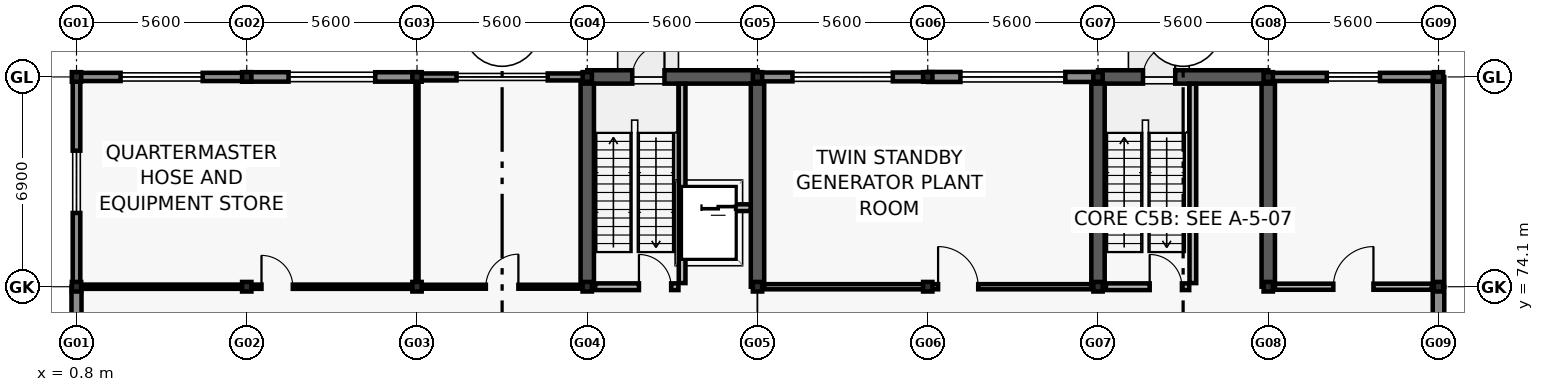
"""IFC4 building model, lengths in metres.
Left out: names, types, materials, properties, quantities, classifications, styles, units other than length and angle.
Written with IfcOpenShell. Run it as: python <this file> out.ifc"""

import sys

from ifc_helpers import new_model, si_unit, direction, frame, frame_2d, origin, origin_2d, place, context, subcontext, project, spatial, rectangle, i_section, extrude, element, fill, save


model = new_model("IFC4")
c1 = context("Model", 3, precision=1e-05, world=origin(), true_north=direction((0.0, 1.0)))
c2 = subcontext(c1, "Body", "Model", "MODEL_VIEW")
j1 = project(units=[si_unit("LENGTHUNIT", "METRE"), si_unit("PLANEANGLEUNIT", "RADIAN")], contexts=[c1])
p1 = place(None, origin())
s1 = spatial("IfcSite", under=j1, at=p1, CompositionType="ELEMENT")
p2 = place(p1, origin())
s2 = spatial("IfcBuilding", under=s1, at=p2, CompositionType="ELEMENT")
p3 = place(p2, origin())
s3 = spatial("IfcBuildingStorey", under=s2, at=p3, CompositionType="ELEMENT", Elevation=0.0)
for number, where, z_axis, x_axis in (
    (1, (0.8, 74.1, 0.0), (0.0, 0.0, 1.0), (1.0, 0.0, 0.0)),
    (2, (0.8, 81.0, 0.0), (0.0, 0.0, 1.0), (1.0, 0.0, 0.0)),
    (3, (6.4, 74.1, 0.0), (0.0, 0.0, 1.0), (1.0, 0.0, 0.0)),
    (4, (6.4, 81.0, 0.0), (0.0, 0.0, 1.0), (1.0, 0.0, 0.0)),
    (5, (12.0, 74.1, 0.0), (0.0, 0.0, 1.0), (1.0, 0.0, 0.0)),
    (6, (12.0, 81.0, 0.0), (0.0, 0.0, 1.0), (1.0, 0.0, 0.0)),
    (7, (17.6, 74.1, 0.0), (0.0, 0.0, 1.0), (1.0, 0.0, 0.0)),
    (8, (17.6, 81.0, 0.0), (0.0, 0.0, 1.0), (1.0, 0.0, 0.0)),
    (9, (23.2, 74.1, 0.0), (0.0, 0.0, 1.0), (1.0, 0.0, 0.0)),
    (10, (23.2, 81.0, 0.0), (0.0, 0.0, 1.0), (1.0, 0.0, 0.0)),
    (11, (28.8, 74.1, 0.0), (0.0, 0.0, 1.0), (1.0, 0.0, 0.0)),
    (12, (28.8, 81.0, 0.0), (0.0, 0.0, 1.0), (1.0, 0.0, 0.0)),
    (13, (34.4, 74.1, 0.0), (0.0, 0.0, 1.0), (1.0, 0.0, 0.0)),
    (14, (34.4, 81.0, 0.0), (0.0, 0.0, 1.0), (1.0, 0.0, 0.0)),
    (15, (40.0, 74.1, 0.0), (0.0, 0.0, 1.0), (1.0, 0.0, 0.0)),
    (16, (40.0, 81.0, 0.0), (0.0, 0.0, 1.0), (1.0, 0.0, 0.0)),
    (17, (45.6, 74.1, 0.0), (0.0, 0.0, 1.0), (1.0, 0.0, 0.0)),
    (18, (45.6, 81.0, 0.0), (0.0, 0.0, 1.0), (1.0, 0.0, 0.0)),
):
    element("IfcColumn", number, at=place(p3, frame(where, z_axis=z_axis, x_axis=x_axis)), inside=s3, PredefinedType="COLUMN", context=c2, shape_type="SweptSolid", body=[
        extrude(i_section(OverallWidth=0.307, OverallDepth=0.315, WebThickness=0.012, FlangeThickness=0.019, FilletRadius=0.017, at=origin_2d()), origin(), (0.0, 0.0, 1.0), 5.4),
    ])
p4 = place(p3, frame((17.6, 81.0, 0.0), z_axis=(0.0, 0.0, 1.0), x_axis=(1.0, 0.0, 0.0)))
e19 = element("IfcWall", 19, at=p4, inside=s3, PredefinedType="SHEAR", context=c2, shape_type="SweptSolid", body=[
    extrude(rectangle(XDim=5.6, YDim=0.44, at=frame_2d((2.8, 0.0))), origin(), (0.0, 0.0, 1.0), 5.16),
])
p5 = place(p4, frame((1.48, 0.0, 0.0)))
e20 = element("IfcOpeningElement", 20, at=p5, cuts=e19, PredefinedType="OPENING", context=c2, shape_type="SweptSolid", body=[
    extrude(rectangle(XDim=1.06, YDim=2.12, at=frame_2d((0.53, 1.06))), frame((0.0, 0.23, 0.0), z_axis=(0.0, -1.0, 0.0), x_axis=(1.0, 0.0, 0.0)), (0.0, 0.0, 1.0), 0.46),
])
for number, where, z_axis, x_axis in (
    (21, (17.6, 74.1, 0.0), (0.0, 0.0, 1.0), (0.0, 1.0, 0.0)),
    (22, (23.2, 74.1, 0.0), (0.0, 0.0, 1.0), (0.0, 1.0, 0.0)),
):
    element("IfcWall", number, at=place(p3, frame(where, z_axis=z_axis, x_axis=x_axis)), inside=s3, PredefinedType="SHEAR", context=c2, shape_type="SweptSolid", body=[
        extrude(rectangle(XDim=6.68, YDim=0.44, at=frame_2d((3.34, 0.0))), origin(), (0.0, 0.0, 1.0), 5.16),
    ])
p6 = place(p3, frame((34.4, 81.0, 0.0), z_axis=(0.0, 0.0, 1.0), x_axis=(1.0, 0.0, 0.0)))
e23 = element("IfcWall", 23, at=p6, inside=s3, PredefinedType="SHEAR", context=c2, shape_type="SweptSolid", body=[
    extrude(rectangle(XDim=5.6, YDim=0.44, at=frame_2d((2.8, 0.0))), origin(), (0.0, 0.0, 1.0), 5.16),
])
p7 = place(p6, frame((1.48, 0.0, 0.0)))
e24 = element("IfcOpeningElement", 24, at=p7, cuts=e23, PredefinedType="OPENING", context=c2, shape_type="SweptSolid", body=[
    extrude(rectangle(XDim=1.06, YDim=2.12, at=frame_2d((0.53, 1.06))), frame((0.0, 0.23, 0.0), z_axis=(0.0, -1.0, 0.0), x_axis=(1.0, 0.0, 0.0)), (0.0, 0.0, 1.0), 0.46),
])
for number, where, z_axis, x_axis in (
    (25, (34.4, 74.1, 0.0), (0.0, 0.0, 1.0), (0.0, 1.0, 0.0)),
    (26, (40.0, 74.1, 0.0), (0.0, 0.0, 1.0), (0.0, 1.0, 0.0)),
):
    element("IfcWall", number, at=place(p3, frame(where, z_axis=z_axis, x_axis=x_axis)), inside=s3, PredefinedType="SHEAR", context=c2, shape_type="SweptSolid", body=[
        extrude(rectangle(XDim=6.68, YDim=0.44, at=frame_2d((3.34, 0.0))), origin(), (0.0, 0.0, 1.0), 5.16),
    ])
p8 = place(p3, frame((0.805, 81.0, 0.0), z_axis=(0.0, 0.0, 1.0), x_axis=(1.0, 0.0, 0.0)))
e27 = element("IfcWall", 27, at=p8, inside=s3, PredefinedType="SOLIDWALL", context=c2, shape_type="SweptSolid", body=[
    extrude(rectangle(XDim=5.59, YDim=0.27, at=frame_2d((2.795, 0.0))), origin(), (0.0, 0.0, 1.0), 4.52),
])
p9 = place(p8, frame((1.445, 0.0, 0.8)))
e28 = element("IfcOpeningElement", 28, at=p9, cuts=e27, PredefinedType="OPENING", context=c2, shape_type="SweptSolid", body=[
    extrude(rectangle(XDim=2.7, YDim=2.1, at=frame_2d((1.35, 1.05))), frame((0.0, 0.145, 0.0), z_axis=(0.0, -1.0, 0.0), x_axis=(1.0, 0.0, 0.0)), (0.0, 0.0, 1.0), 0.29),
])
p10 = place(p3, frame((6.405, 81.0, 0.0), z_axis=(0.0, 0.0, 1.0), x_axis=(1.0, 0.0, 0.0)))
e29 = element("IfcWall", 29, at=p10, inside=s3, PredefinedType="SOLIDWALL", context=c2, shape_type="SweptSolid", body=[
    extrude(rectangle(XDim=5.59, YDim=0.31, at=frame_2d((2.795, 0.0))), origin(), (0.0, 0.0, 1.0), 4.52),
])
p11 = place(p10, frame((1.37, 0.0, 0.8)))
e30 = element("IfcOpeningElement", 30, at=p11, cuts=e29, PredefinedType="OPENING", context=c2, shape_type="SweptSolid", body=[
    extrude(rectangle(XDim=2.85, YDim=2.1, at=frame_2d((1.425, 1.05))), frame((0.0, 0.165, 0.0), z_axis=(0.0, -1.0, 0.0), x_axis=(1.0, 0.0, 0.0)), (0.0, 0.0, 1.0), 0.33),
])
p12 = place(p3, frame((12.005, 81.0, 0.0), z_axis=(0.0, 0.0, 1.0), x_axis=(1.0, 0.0, 0.0)))
e31 = element("IfcWall", 31, at=p12, inside=s3, PredefinedType="SOLIDWALL", context=c2, shape_type="SweptSolid", body=[
    extrude(rectangle(XDim=5.59, YDim=0.23, at=frame_2d((2.795, 0.0))), origin(), (0.0, 0.0, 1.0), 4.52),
])
p13 = place(p12, frame((1.295, 0.0, 0.8)))
e32 = element("IfcOpeningElement", 32, at=p13, cuts=e31, PredefinedType="OPENING", context=c2, shape_type="SweptSolid", body=[
    extrude(rectangle(XDim=3.0, YDim=2.1, at=frame_2d((1.5, 1.05))), frame((0.0, 0.125, 0.0), z_axis=(0.0, -1.0, 0.0), x_axis=(1.0, 0.0, 0.0)), (0.0, 0.0, 1.0), 0.25),
])
p14 = place(p3, frame((23.205, 81.0, 0.0), z_axis=(0.0, 0.0, 1.0), x_axis=(1.0, 0.0, 0.0)))
e33 = element("IfcWall", 33, at=p14, inside=s3, PredefinedType="SOLIDWALL", context=c2, shape_type="SweptSolid", body=[
    extrude(rectangle(XDim=5.59, YDim=0.29, at=frame_2d((2.795, 0.0))), origin(), (0.0, 0.0, 1.0), 4.52),
])
p15 = place(p14, frame((1.145, 0.0, 0.8)))
e34 = element("IfcOpeningElement", 34, at=p15, cuts=e33, PredefinedType="OPENING", context=c2, shape_type="SweptSolid", body=[
    extrude(rectangle(XDim=3.3, YDim=2.2, at=frame_2d((1.65, 1.1))), frame((0.0, 0.155, 0.0), z_axis=(0.0, -1.0, 0.0), x_axis=(1.0, 0.0, 0.0)), (0.0, 0.0, 1.0), 0.31),
])
p16 = place(p3, frame((28.805, 81.0, 0.0), z_axis=(0.0, 0.0, 1.0), x_axis=(1.0, 0.0, 0.0)))
e35 = element("IfcWall", 35, at=p16, inside=s3, PredefinedType="SOLIDWALL", context=c2, shape_type="SweptSolid", body=[
    extrude(rectangle(XDim=5.59, YDim=0.33, at=frame_2d((2.795, 0.0))), origin(), (0.0, 0.0, 1.0), 4.52),
])
p17 = place(p16, frame((1.07, 0.0, 0.8)))
e36 = element("IfcOpeningElement", 36, at=p17, cuts=e35, PredefinedType="OPENING", context=c2, shape_type="SweptSolid", body=[
    extrude(rectangle(XDim=3.45, YDim=2.2, at=frame_2d((1.725, 1.1))), frame((0.0, 0.175, 0.0), z_axis=(0.0, -1.0, 0.0), x_axis=(1.0, 0.0, 0.0)), (0.0, 0.0, 1.0), 0.35),
])
p18 = place(p3, frame((40.005, 81.0, 0.0), z_axis=(0.0, 0.0, 1.0), x_axis=(1.0, 0.0, 0.0)))
e37 = element("IfcWall", 37, at=p18, inside=s3, PredefinedType="SOLIDWALL", context=c2, shape_type="SweptSolid", body=[
    extrude(rectangle(XDim=5.59, YDim=0.27, at=frame_2d((2.795, 0.0))), origin(), (0.0, 0.0, 1.0), 4.52),
])
p19 = place(p18, frame((1.92, 0.0, 0.8)))
e38 = element("IfcOpeningElement", 38, at=p19, cuts=e37, PredefinedType="OPENING", context=c2, shape_type="SweptSolid", body=[
    extrude(rectangle(XDim=1.75, YDim=1.8, at=frame_2d((0.875, 0.9))), frame((0.0, 0.145, 0.0), z_axis=(0.0, -1.0, 0.0), x_axis=(1.0, 0.0, 0.0)), (0.0, 0.0, 1.0), 0.29),
])
p20 = place(p3, frame((0.8, 67.205, 0.0), z_axis=(0.0, 0.0, 1.0), x_axis=(0.0, 1.0, 0.0)))
e39 = element("IfcWall", 39, at=p20, inside=s3, PredefinedType="SOLIDWALL", context=c2, shape_type="SweptSolid", body=[
    extrude(rectangle(XDim=6.89, YDim=0.33, at=frame_2d((3.445, 0.0))), origin(), (0.0, 0.0, 1.0), 4.52),
])
p21 = place(p20, frame((1.312, 0.0, 0.8)))
e40 = element("IfcOpeningElement", 40, at=p21, cuts=e39, PredefinedType="OPENING", context=c2, shape_type="SweptSolid", body=[
    extrude(rectangle(XDim=1.9, YDim=1.8, at=frame_2d((0.95, 0.9))), frame((0.0, 0.175, 0.0), z_axis=(0.0, -1.0, 0.0), x_axis=(1.0, 0.0, 0.0)), (0.0, 0.0, 1.0), 0.35),
])
p22 = place(p3, frame((45.6, 74.095, 0.0), z_axis=(0.0, 0.0, 1.0), x_axis=(0.0, -1.0, 0.0)))
e41 = element("IfcWall", 41, at=p22, inside=s3, PredefinedType="SOLIDWALL", context=c2, shape_type="SweptSolid", body=[
    extrude(rectangle(XDim=6.89, YDim=0.38, at=frame_2d((3.445, 0.0))), origin(), (0.0, 0.0, 1.0), 4.52),
])
p23 = place(p3, frame((0.8, 74.105, 0.0), z_axis=(0.0, 0.0, 1.0), x_axis=(0.0, 1.0, 0.0)))
e42 = element("IfcWall", 42, at=p23, inside=s3, PredefinedType="SOLIDWALL", context=c2, shape_type="SweptSolid", body=[
    extrude(rectangle(XDim=6.89, YDim=0.25, at=frame_2d((3.445, 0.0))), origin(), (0.0, 0.0, 1.0), 4.52),
])
p24 = place(p23, frame((2.42, 0.0, 0.8)))
e43 = element("IfcOpeningElement", 43, at=p24, cuts=e42, PredefinedType="OPENING", context=c2, shape_type="SweptSolid", body=[
    extrude(rectangle(XDim=2.05, YDim=1.8, at=frame_2d((1.025, 0.9))), frame((0.0, 0.135, 0.0), z_axis=(0.0, -1.0, 0.0), x_axis=(1.0, 0.0, 0.0)), (0.0, 0.0, 1.0), 0.27),
])
p25 = place(p3, frame((45.6, 80.995, 0.0), z_axis=(0.0, 0.0, 1.0), x_axis=(0.0, -1.0, 0.0)))
e44 = element("IfcWall", 44, at=p25, inside=s3, PredefinedType="SOLIDWALL", context=c2, shape_type="SweptSolid", body=[
    extrude(rectangle(XDim=6.89, YDim=0.38, at=frame_2d((3.445, 0.0))), origin(), (0.0, 0.0, 1.0), 4.52),
])
p26 = place(p3, frame((20.72, 74.22, 0.0), z_axis=(0.0, 0.0, 1.0), x_axis=(0.0, 1.0, 0.0)))
e45 = element("IfcWall", 45, at=p26, inside=s3, PredefinedType="SOLIDWALL", context=c2, shape_type="SweptSolid", body=[
    extrude(rectangle(XDim=6.555, YDim=0.22, at=frame_2d((3.277, 0.0))), origin(), (0.0, 0.0, 1.0), 5.16),
])
p27 = place(p3, frame((17.86, 74.1, 0.0), z_axis=(0.0, 0.0, 1.0), x_axis=(1.0, 0.0, 0.0)))
e46 = element("IfcWall", 46, at=p27, inside=s3, PredefinedType="SOLIDWALL", context=c2, shape_type="SweptSolid", body=[
    extrude(rectangle(XDim=2.74, YDim=0.22, at=frame_2d((1.37, 0.0))), origin(), (0.0, 0.0, 1.0), 4.52),
])
p28 = place(p27, frame((1.44, 0.0, 0.0)))
e47 = element("IfcOpeningElement", 47, at=p28, cuts=e46, PredefinedType="OPENING", context=c2, shape_type="SweptSolid", body=[
    extrude(rectangle(XDim=1.06, YDim=2.1, at=frame_2d((0.53, 1.05))), frame((0.0, 0.12, 0.0), z_axis=(0.0, -1.0, 0.0), x_axis=(1.0, 0.0, 0.0)), (0.0, 0.0, 1.0), 0.24),
])
p29 = place(p3, frame((20.84, 76.7, 0.0), z_axis=(0.0, 0.0, 1.0), x_axis=(1.0, 0.0, 0.0)))
e48 = element("IfcWall", 48, at=p29, inside=s3, PredefinedType="SOLIDWALL", context=c2, shape_type="SweptSolid", body=[
    extrude(rectangle(XDim=2.135, YDim=0.22, at=frame_2d((1.067, 0.0))), origin(), (0.0, 0.0, 1.0), 5.16),
])
p30 = place(p29, frame((0.518, 0.0, 0.0)))
e49 = element("IfcOpeningElement", 49, at=p30, cuts=e48, PredefinedType="OPENING", context=c2, shape_type="SweptSolid", body=[
    extrude(rectangle(XDim=1.1, YDim=2.1, at=frame_2d((0.55, 1.05))), frame((0.0, 0.12, 0.0), z_axis=(0.0, -1.0, 0.0), x_axis=(1.0, 0.0, 0.0)), (0.0, 0.0, 1.0), 0.24),
])
p31 = place(p3, frame((37.52, 74.22, 0.0), z_axis=(0.0, 0.0, 1.0), x_axis=(0.0, 1.0, 0.0)))
e50 = element("IfcWall", 50, at=p31, inside=s3, PredefinedType="SOLIDWALL", context=c2, shape_type="SweptSolid", body=[
    extrude(rectangle(XDim=6.555, YDim=0.22, at=frame_2d((3.277, 0.0))), origin(), (0.0, 0.0, 1.0), 5.16),
])
p32 = place(p3, frame((34.66, 74.1, 0.0), z_axis=(0.0, 0.0, 1.0), x_axis=(1.0, 0.0, 0.0)))
e51 = element("IfcWall", 51, at=p32, inside=s3, PredefinedType="SOLIDWALL", context=c2, shape_type="SweptSolid", body=[
    extrude(rectangle(XDim=2.74, YDim=0.22, at=frame_2d((1.37, 0.0))), origin(), (0.0, 0.0, 1.0), 4.52),
])
p33 = place(p32, frame((1.44, 0.0, 0.0)))
e52 = element("IfcOpeningElement", 52, at=p33, cuts=e51, PredefinedType="OPENING", context=c2, shape_type="SweptSolid", body=[
    extrude(rectangle(XDim=1.06, YDim=2.1, at=frame_2d((0.53, 1.05))), frame((0.0, 0.12, 0.0), z_axis=(0.0, -1.0, 0.0), x_axis=(1.0, 0.0, 0.0)), (0.0, 0.0, 1.0), 0.24),
])
p34 = place(p3, frame((1.02, 74.1, 0.0), z_axis=(0.0, 0.0, 1.0), x_axis=(1.0, 0.0, 0.0)))
e53 = element("IfcWall", 53, at=p34, inside=s3, PredefinedType="PARTITIONING", context=c2, shape_type="SweptSolid", body=[
    extrude(rectangle(XDim=10.76, YDim=0.14, at=frame_2d((5.38, 0.0))), origin(), (0.0, 0.0, 1.0), 4.5),
])
p35 = place(p34, frame((5.865, 0.0, 0.0)))
e54 = element("IfcOpeningElement", 54, at=p35, cuts=e53, PredefinedType="OPENING", context=c2, shape_type="SweptSolid", body=[
    extrude(rectangle(XDim=1.03, YDim=2.06, at=frame_2d((0.515, 1.03))), frame((0.0, 0.08, 0.0), z_axis=(0.0, -1.0, 0.0), x_axis=(1.0, 0.0, 0.0)), (0.0, 0.0, 1.0), 0.16),
])
p36 = place(p3, frame((12.22, 74.1, 0.0), z_axis=(0.0, 0.0, 1.0), x_axis=(1.0, 0.0, 0.0)))
e55 = element("IfcWall", 55, at=p36, inside=s3, PredefinedType="PARTITIONING", context=c2, shape_type="SweptSolid", body=[
    extrude(rectangle(XDim=5.16, YDim=0.13, at=frame_2d((2.58, 0.0))), origin(), (0.0, 0.0, 1.0), 4.5),
])
p37 = place(p36, frame((2.045, 0.0, 0.0)))
e56 = element("IfcOpeningElement", 56, at=p37, cuts=e55, PredefinedType="OPENING", context=c2, shape_type="SweptSolid", body=[
    extrude(rectangle(XDim=1.07, YDim=2.08, at=frame_2d((0.535, 1.04))), frame((0.0, 0.075, 0.0), z_axis=(0.0, -1.0, 0.0), x_axis=(1.0, 0.0, 0.0)), (0.0, 0.0, 1.0), 0.15),
])
p38 = place(p3, frame((23.42, 74.1, 0.0), z_axis=(0.0, 0.0, 1.0), x_axis=(1.0, 0.0, 0.0)))
e57 = element("IfcWall", 57, at=p38, inside=s3, PredefinedType="PARTITIONING", context=c2, shape_type="SweptSolid", body=[
    extrude(rectangle(XDim=10.76, YDim=0.17, at=frame_2d((5.38, 0.0))), origin(), (0.0, 0.0, 1.0), 4.5),
])
p39 = place(p38, frame((5.72, 0.0, 0.0)))
e58 = element("IfcOpeningElement", 58, at=p39, cuts=e57, PredefinedType="OPENING", context=c2, shape_type="SweptSolid", body=[
    extrude(rectangle(XDim=1.32, YDim=2.12, at=frame_2d((0.66, 1.06))), frame((0.0, 0.095, 0.0), z_axis=(0.0, -1.0, 0.0), x_axis=(1.0, 0.0, 0.0)), (0.0, 0.0, 1.0), 0.19),
])
p40 = place(p3, frame((40.22, 74.1, 0.0), z_axis=(0.0, 0.0, 1.0), x_axis=(1.0, 0.0, 0.0)))
e59 = element("IfcWall", 59, at=p40, inside=s3, PredefinedType="PARTITIONING", context=c2, shape_type="SweptSolid", body=[
    extrude(rectangle(XDim=5.16, YDim=0.2, at=frame_2d((2.58, 0.0))), origin(), (0.0, 0.0, 1.0), 4.5),
])
p41 = place(p40, frame((1.92, 0.0, 0.0)))
e60 = element("IfcOpeningElement", 60, at=p41, cuts=e59, PredefinedType="OPENING", context=c2, shape_type="SweptSolid", body=[
    extrude(rectangle(XDim=1.32, YDim=2.12, at=frame_2d((0.66, 1.06))), frame((0.0, 0.11, 0.0), z_axis=(0.0, -1.0, 0.0), x_axis=(1.0, 0.0, 0.0)), (0.0, 0.0, 1.0), 0.22),
])
p42 = place(p3, frame((12.0, 74.32, 0.0), z_axis=(0.0, 0.0, 1.0), x_axis=(0.0, 1.0, 0.0)))
e61 = element("IfcWall", 61, at=p42, inside=s3, PredefinedType="PARTITIONING", context=c2, shape_type="SweptSolid", body=[
    extrude(rectangle(XDim=6.46, YDim=0.1, at=frame_2d((3.23, 0.0))), origin(), (0.0, 0.0, 1.0), 4.5),
])
p43 = place(p9, origin())
e62 = element("IfcWindow", 62, at=p43, inside=s3, PartitioningType="TRIPLE_PANEL_VERTICAL", PredefinedType="WINDOW", context=c2, shape_type="SweptSolid", body=[
    extrude(rectangle(XDim=2.7, YDim=2.1, at=frame_2d((1.35, 1.05))), frame((0.0, 0.03, 0.0), z_axis=(0.0, -1.0, 0.0), x_axis=(1.0, 0.0, 0.0)), (0.0, 0.0, 1.0), 0.06),
])
fill(e28, e62)
p44 = place(p11, origin())
e63 = element("IfcWindow", 63, at=p44, inside=s3, PartitioningType="TRIPLE_PANEL_VERTICAL", PredefinedType="WINDOW", context=c2, shape_type="SweptSolid", body=[
    extrude(rectangle(XDim=2.85, YDim=2.1, at=frame_2d((1.425, 1.05))), frame((0.0, 0.03, 0.0), z_axis=(0.0, -1.0, 0.0), x_axis=(1.0, 0.0, 0.0)), (0.0, 0.0, 1.0), 0.06),
])
fill(e30, e63)
p45 = place(p13, origin())
e64 = element("IfcWindow", 64, at=p45, inside=s3, PartitioningType="TRIPLE_PANEL_VERTICAL", PredefinedType="WINDOW", context=c2, shape_type="SweptSolid", body=[
    extrude(rectangle(XDim=3.0, YDim=2.1, at=frame_2d((1.5, 1.05))), frame((0.0, 0.03, 0.0), z_axis=(0.0, -1.0, 0.0), x_axis=(1.0, 0.0, 0.0)), (0.0, 0.0, 1.0), 0.06),
])
fill(e32, e64)
p46 = place(p15, origin())
e65 = element("IfcWindow", 65, at=p46, inside=s3, PartitioningType="TRIPLE_PANEL_VERTICAL", PredefinedType="WINDOW", context=c2, shape_type="SweptSolid", body=[
    extrude(rectangle(XDim=3.3, YDim=2.2, at=frame_2d((1.65, 1.1))), frame((0.0, 0.03, 0.0), z_axis=(0.0, -1.0, 0.0), x_axis=(1.0, 0.0, 0.0)), (0.0, 0.0, 1.0), 0.06),
])
fill(e34, e65)
p47 = place(p17, origin())
e66 = element("IfcWindow", 66, at=p47, inside=s3, PartitioningType="TRIPLE_PANEL_VERTICAL", PredefinedType="WINDOW", context=c2, shape_type="SweptSolid", body=[
    extrude(rectangle(XDim=3.45, YDim=2.2, at=frame_2d((1.725, 1.1))), frame((0.0, 0.03, 0.0), z_axis=(0.0, -1.0, 0.0), x_axis=(1.0, 0.0, 0.0)), (0.0, 0.0, 1.0), 0.06),
])
fill(e36, e66)
p48 = place(p19, origin())
e67 = element("IfcWindow", 67, at=p48, inside=s3, PartitioningType="DOUBLE_PANEL_VERTICAL", PredefinedType="WINDOW", context=c2, shape_type="SweptSolid", body=[
    extrude(rectangle(XDim=1.75, YDim=1.8, at=frame_2d((0.875, 0.9))), frame((0.0, 0.03, 0.0), z_axis=(0.0, -1.0, 0.0), x_axis=(1.0, 0.0, 0.0)), (0.0, 0.0, 1.0), 0.06),
])
fill(e38, e67)
p49 = place(p24, origin())
e68 = element("IfcWindow", 68, at=p49, inside=s3, PartitioningType="DOUBLE_PANEL_VERTICAL", PredefinedType="WINDOW", context=c2, shape_type="SweptSolid", body=[
    extrude(rectangle(XDim=2.05, YDim=1.8, at=frame_2d((1.025, 0.9))), frame((0.0, 0.03, 0.0), z_axis=(0.0, -1.0, 0.0), x_axis=(1.0, 0.0, 0.0)), (0.0, 0.0, 1.0), 0.06),
])
fill(e43, e68)
p50 = place(p28, origin())
e69 = element("IfcDoor", 69, at=p50, inside=s3, OperationType="SINGLE_SWING_LEFT", PredefinedType="DOOR", context=c2, shape_type="SweptSolid", body=[
    extrude(rectangle(XDim=1.06, YDim=2.1, at=frame_2d((0.53, 1.05))), frame((0.0, 0.025, 0.0), z_axis=(0.0, -1.0, 0.0), x_axis=(1.0, 0.0, 0.0)), (0.0, 0.0, 1.0), 0.05),
])
fill(e47, e69)
p51 = place(p5, origin())
e70 = element("IfcDoor", 70, at=p51, inside=s3, OperationType="SINGLE_SWING_RIGHT", PredefinedType="DOOR", context=c2, shape_type="SweptSolid", body=[
    extrude(rectangle(XDim=1.06, YDim=2.12, at=frame_2d((0.53, 1.06))), frame((0.0, 0.025, 0.0), z_axis=(0.0, -1.0, 0.0), x_axis=(1.0, 0.0, 0.0)), (0.0, 0.0, 1.0), 0.05),
])
fill(e20, e70)
p52 = place(p30, origin())
e71 = element("IfcDoor", 71, at=p52, inside=s3, OperationType="DOUBLE_DOOR_SLIDING", PredefinedType="DOOR", context=c2, shape_type="SweptSolid", body=[
    extrude(rectangle(XDim=1.1, YDim=2.1, at=frame_2d((0.55, 1.05))), frame((0.0, 0.025, 0.0), z_axis=(0.0, -1.0, 0.0), x_axis=(1.0, 0.0, 0.0)), (0.0, 0.0, 1.0), 0.05),
])
fill(e49, e71)
p53 = place(p33, origin())
e72 = element("IfcDoor", 72, at=p53, inside=s3, OperationType="SINGLE_SWING_LEFT", PredefinedType="DOOR", context=c2, shape_type="SweptSolid", body=[
    extrude(rectangle(XDim=1.06, YDim=2.1, at=frame_2d((0.53, 1.05))), frame((0.0, 0.025, 0.0), z_axis=(0.0, -1.0, 0.0), x_axis=(1.0, 0.0, 0.0)), (0.0, 0.0, 1.0), 0.05),
])
fill(e52, e72)
p54 = place(p7, origin())
e73 = element("IfcDoor", 73, at=p54, inside=s3, OperationType="SINGLE_SWING_RIGHT", PredefinedType="DOOR", context=c2, shape_type="SweptSolid", body=[
    extrude(rectangle(XDim=1.06, YDim=2.12, at=frame_2d((0.53, 1.06))), frame((0.0, 0.025, 0.0), z_axis=(0.0, -1.0, 0.0), x_axis=(1.0, 0.0, 0.0)), (0.0, 0.0, 1.0), 0.05),
])
fill(e24, e73)
p55 = place(p35, origin())
e74 = element("IfcDoor", 74, at=p55, inside=s3, OperationType="SINGLE_SWING_LEFT", PredefinedType="DOOR", context=c2, shape_type="SweptSolid", body=[
    extrude(rectangle(XDim=1.03, YDim=2.06, at=frame_2d((0.515, 1.03))), frame((0.0, 0.025, 0.0), z_axis=(0.0, -1.0, 0.0), x_axis=(1.0, 0.0, 0.0)), (0.0, 0.0, 1.0), 0.05),
])
fill(e54, e74)
p56 = place(p37, origin())
e75 = element("IfcDoor", 75, at=p56, inside=s3, OperationType="SINGLE_SWING_RIGHT", PredefinedType="DOOR", context=c2, shape_type="SweptSolid", body=[
    extrude(rectangle(XDim=1.07, YDim=2.08, at=frame_2d((0.535, 1.04))), frame((0.0, 0.025, 0.0), z_axis=(0.0, -1.0, 0.0), x_axis=(1.0, 0.0, 0.0)), (0.0, 0.0, 1.0), 0.05),
])
fill(e56, e75)
p57 = place(p39, origin())
e76 = element("IfcDoor", 76, at=p57, inside=s3, OperationType="SINGLE_SWING_LEFT", PredefinedType="DOOR", context=c2, shape_type="SweptSolid", body=[
    extrude(rectangle(XDim=1.32, YDim=2.12, at=frame_2d((0.66, 1.06))), frame((0.0, 0.025, 0.0), z_axis=(0.0, -1.0, 0.0), x_axis=(1.0, 0.0, 0.0)), (0.0, 0.0, 1.0), 0.05),
])
fill(e58, e76)
p58 = place(p41, origin())
e77 = element("IfcDoor", 77, at=p58, inside=s3, OperationType="SINGLE_SWING_RIGHT", PredefinedType="DOOR", context=c2, shape_type="SweptSolid", body=[
    extrude(rectangle(XDim=1.32, YDim=2.12, at=frame_2d((0.66, 1.06))), frame((0.0, 0.025, 0.0), z_axis=(0.0, -1.0, 0.0), x_axis=(1.0, 0.0, 0.0)), (0.0, 0.0, 1.0), 0.05),
])
fill(e60, e77)
save(model, sys.argv[1])
